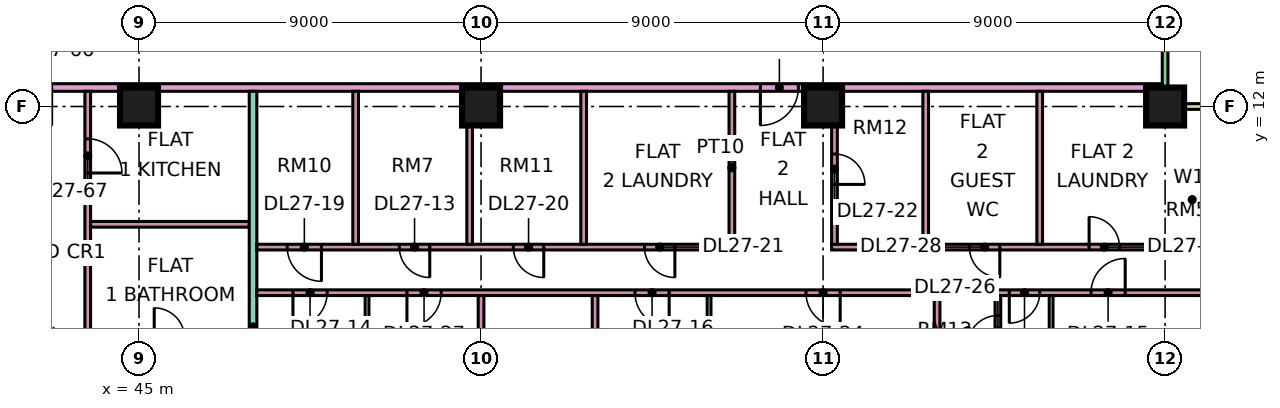
"""IFC4 building model, lengths in metres.
Left out: names, types, materials, properties, quantities, classifications, styles, units other than length and angle.
Written with IfcOpenShell. Run it as: python <this file> out.ifc"""

import sys

from ifc_helpers import new_model, si_unit, direction, frame, frame_2d, origin, origin_2d, place, context, subcontext, project, spatial, rectangle, extrude, element, fill, save


model = new_model("IFC4")
c1 = context("Model", 3, precision=1e-05, world=origin(), true_north=direction((0.0, 1.0)))
c2 = subcontext(c1, "Body", "Model", "MODEL_VIEW")
j1 = project(units=[si_unit("LENGTHUNIT", "METRE"), si_unit("PLANEANGLEUNIT", "RADIAN")], contexts=[c1])
p1 = place(None, origin())
s1 = spatial("IfcSite", under=j1, at=p1, CompositionType="ELEMENT")
p2 = place(p1, origin())
s2 = spatial("IfcBuilding", under=s1, at=p2, CompositionType="ELEMENT")
p3 = place(p2, frame((0.0, 0.0, 118.15)))
s3 = spatial("IfcBuildingStorey", under=s2, at=p3, CompositionType="ELEMENT", Elevation=118.15)
for number, where, z_axis, x_axis in (
    (1, (45.0, 12.0, 0.0), (0.0, 0.0, 1.0), (1.0, 0.0, 0.0)),
    (2, (54.0, 12.0, 0.0), (0.0, 0.0, 1.0), (1.0, 0.0, 0.0)),
    (3, (63.0, 12.0, 0.0), (0.0, 0.0, 1.0), (1.0, 0.0, 0.0)),
    (4, (72.0, 12.0, 0.0), (0.0, 0.0, 1.0), (1.0, 0.0, 0.0)),
):
    element("IfcColumn", number, at=place(p3, frame(where, z_axis=z_axis, x_axis=x_axis)), inside=s3, PredefinedType="COLUMN", context=c2, shape_type="SweptSolid", body=[
        extrude(rectangle(XDim=1.0, YDim=1.0, at=origin_2d()), origin(), (0.0, 0.0, 1.0), 3.75),
    ])
p4 = place(p3, frame((72.0, 12.075, 0.0), z_axis=(0.0, 0.0, 1.0), x_axis=(0.0, 1.0, 0.0)))
e5 = element("IfcWall", 5, at=p4, inside=s3, PredefinedType="SOLIDWALL", context=c2, shape_type="SweptSolid", body=[
    extrude(rectangle(XDim=10.35, YDim=0.15, at=frame_2d((5.175, 0.0))), origin(), (0.0, 0.0, 1.0), 3.35),
])
p5 = place(p4, frame((3.975, 0.0, 0.45)))
e6 = element("IfcOpeningElement", 6, at=p5, cuts=e5, PredefinedType="OPENING", context=c2, shape_type="SweptSolid", body=[
    extrude(rectangle(XDim=2.4, YDim=2.4, at=frame_2d((1.2, 1.2))), frame((0.0, 0.085, 0.0), z_axis=(0.0, -1.0, 0.0), x_axis=(1.0, 0.0, 0.0)), (0.0, 0.0, 1.0), 0.17),
])
p6 = place(p4, frame((7.688, 0.0, 0.0)))
e7 = element("IfcOpeningElement", 7, at=p6, cuts=e5, PredefinedType="OPENING", context=c2, shape_type="SweptSolid", body=[
    extrude(rectangle(XDim=1.8, YDim=2.4, at=frame_2d((0.9, 1.2))), frame((0.0, 0.085, 0.0), z_axis=(0.0, -1.0, 0.0), x_axis=(1.0, 0.0, 0.0)), (0.0, 0.0, 1.0), 0.17),
])
p7 = place(p3, frame((73.5, 12.0, 0.0), z_axis=(0.0, 0.0, 1.0), x_axis=(-1.0, 0.0, 0.0)))
e8 = element("IfcWall", 8, at=p7, inside=s3, PredefinedType="SOLIDWALL", context=c2, shape_type="SweptSolid", body=[
    extrude(rectangle(XDim=1.5, YDim=0.15, at=frame_2d((0.75, 0.0))), origin(), (0.0, 0.0, 1.0), 3.35),
])
p8 = place(p3, frame((40.65, 12.5, 0.0), z_axis=(0.0, 0.0, 1.0), x_axis=(1.0, 0.0, 0.0)))
e9 = element("IfcWall", 9, at=p8, inside=s3, PredefinedType="PARTITIONING", context=c2, shape_type="SweptSolid", body=[
    extrude(rectangle(XDim=31.276, YDim=0.2, at=frame_2d((15.638, 0.0))), origin(), (0.0, 0.0, 1.0), 3.35),
])
p9 = place(p8, frame((20.7, 0.0, 0.0)))
e10 = element("IfcOpeningElement", 10, at=p9, cuts=e9, PredefinedType="OPENING", context=c2, shape_type="SweptSolid", body=[
    extrude(rectangle(XDim=1.0, YDim=2.1, at=frame_2d((0.5, 1.05))), frame((0.0, 0.11, 0.0), z_axis=(0.0, -1.0, 0.0), x_axis=(1.0, 0.0, 0.0)), (0.0, 0.0, 1.0), 0.22),
])
p10 = place(p8, frame((1.05, 0.0, 0.0)))
e11 = element("IfcOpeningElement", 11, at=p10, cuts=e9, PredefinedType="OPENING", context=c2, shape_type="SweptSolid", body=[
    extrude(rectangle(XDim=1.0, YDim=2.1, at=frame_2d((0.5, 1.05))), frame((0.0, 0.11, 0.0), z_axis=(0.0, -1.0, 0.0), x_axis=(1.0, 0.0, 0.0)), (0.0, 0.0, 1.0), 0.22),
])
p11 = place(p3, frame((43.65, 5.825, 0.0), z_axis=(0.0, 0.0, 1.0), x_axis=(0.0, 1.0, 0.0)))
e12 = element("IfcWall", 12, at=p11, inside=s3, PredefinedType="PARTITIONING", context=c2, shape_type="SweptSolid", body=[
    extrude(rectangle(XDim=6.575, YDim=0.15, at=frame_2d((3.288, 0.0))), origin(), (0.0, 0.0, 1.0), 3.35),
])
p12 = place(p11, frame((4.425, 0.0, 0.0)))
e13 = element("IfcOpeningElement", 13, at=p12, cuts=e12, PredefinedType="OPENING", context=c2, shape_type="SweptSolid", body=[
    extrude(rectangle(XDim=0.9, YDim=2.1, at=frame_2d((0.45, 1.05))), frame((0.0, 0.085, 0.0), z_axis=(0.0, -1.0, 0.0), x_axis=(1.0, 0.0, 0.0)), (0.0, 0.0, 1.0), 0.17),
])
p13 = place(p3, frame((43.725, 8.9, 0.0), z_axis=(0.0, 0.0, 1.0), x_axis=(1.0, 0.0, 0.0)))
e14 = element("IfcWall", 14, at=p13, inside=s3, PredefinedType="PARTITIONING", context=c2, shape_type="SweptSolid", body=[
    extrude(rectangle(XDim=4.175, YDim=0.15, at=frame_2d((2.087, 0.0))), origin(), (0.0, 0.0, 1.0), 3.35),
])
p14 = place(p3, frame((48.0, 0.0, 0.0), z_axis=(0.0, 0.0, 1.0), x_axis=(0.0, 1.0, 0.0)))
e15 = element("IfcWall", 15, at=p14, inside=s3, PredefinedType="PARTITIONING", context=c2, shape_type="SweptSolid", body=[
    extrude(rectangle(XDim=12.4, YDim=0.2, at=frame_2d((6.2, 0.0))), origin(), (0.0, 0.0, 1.0), 3.35),
])
p15 = place(p3, frame((48.1, 7.1, 0.0), z_axis=(0.0, 0.0, 1.0), x_axis=(1.0, 0.0, 0.0)))
e16 = element("IfcWall", 16, at=p15, inside=s3, PredefinedType="PARTITIONING", context=c2, shape_type="SweptSolid", body=[
    extrude(rectangle(XDim=25.25, YDim=0.15, at=frame_2d((12.625, 0.0))), origin(), (0.0, 0.0, 1.0), 3.35),
])
p16 = place(p15, frame((0.95, 0.0, 0.0)))
e17 = element("IfcOpeningElement", 17, at=p16, cuts=e16, PredefinedType="OPENING", context=c2, shape_type="SweptSolid", body=[
    extrude(rectangle(XDim=0.9, YDim=2.1, at=frame_2d((0.45, 1.05))), frame((0.0, 0.085, 0.0), z_axis=(0.0, -1.0, 0.0), x_axis=(1.0, 0.0, 0.0)), (0.0, 0.0, 1.0), 0.17),
])
p17 = place(p15, frame((21.95, 0.0, 0.0)))
e18 = element("IfcOpeningElement", 18, at=p17, cuts=e16, PredefinedType="OPENING", context=c2, shape_type="SweptSolid", body=[
    extrude(rectangle(XDim=0.9, YDim=2.1, at=frame_2d((0.45, 1.05))), frame((0.0, 0.085, 0.0), z_axis=(0.0, -1.0, 0.0), x_axis=(1.0, 0.0, 0.0)), (0.0, 0.0, 1.0), 0.17),
])
p18 = place(p15, frame((9.95, 0.0, 0.0)))
e19 = element("IfcOpeningElement", 19, at=p18, cuts=e16, PredefinedType="OPENING", context=c2, shape_type="SweptSolid", body=[
    extrude(rectangle(XDim=0.9, YDim=2.1, at=frame_2d((0.45, 1.05))), frame((0.0, 0.085, 0.0), z_axis=(0.0, -1.0, 0.0), x_axis=(1.0, 0.0, 0.0)), (0.0, 0.0, 1.0), 0.17),
])
p19 = place(p15, frame((14.45, 0.0, 0.0)))
e20 = element("IfcOpeningElement", 20, at=p19, cuts=e16, PredefinedType="OPENING", context=c2, shape_type="SweptSolid", body=[
    extrude(rectangle(XDim=0.9, YDim=2.1, at=frame_2d((0.45, 1.05))), frame((0.0, 0.085, 0.0), z_axis=(0.0, -1.0, 0.0), x_axis=(1.0, 0.0, 0.0)), (0.0, 0.0, 1.0), 0.17),
])
p20 = place(p15, frame((19.8, 0.0, 0.0)))
e21 = element("IfcOpeningElement", 21, at=p20, cuts=e16, PredefinedType="OPENING", context=c2, shape_type="SweptSolid", body=[
    extrude(rectangle(XDim=0.8, YDim=2.1, at=frame_2d((0.4, 1.05))), frame((0.0, 0.085, 0.0), z_axis=(0.0, -1.0, 0.0), x_axis=(1.0, 0.0, 0.0)), (0.0, 0.0, 1.0), 0.17),
])
p21 = place(p15, frame((3.95, 0.0, 0.0)))
e22 = element("IfcOpeningElement", 22, at=p21, cuts=e16, PredefinedType="OPENING", context=c2, shape_type="SweptSolid", body=[
    extrude(rectangle(XDim=0.9, YDim=2.1, at=frame_2d((0.45, 1.05))), frame((0.0, 0.085, 0.0), z_axis=(0.0, -1.0, 0.0), x_axis=(1.0, 0.0, 0.0)), (0.0, 0.0, 1.0), 0.17),
])
p22 = place(p3, frame((48.1, 8.3, 0.0), z_axis=(0.0, 0.0, 1.0), x_axis=(1.0, 0.0, 0.0)))
e23 = element("IfcWall", 23, at=p22, inside=s3, PredefinedType="PARTITIONING", context=c2, shape_type="SweptSolid", body=[
    extrude(rectangle(XDim=12.575, YDim=0.15, at=frame_2d((6.288, 0.0))), origin(), (0.0, 0.0, 1.0), 3.35),
])
p23 = place(p22, frame((3.75, 0.0, 0.0)))
e24 = element("IfcOpeningElement", 24, at=p23, cuts=e23, PredefinedType="OPENING", context=c2, shape_type="SweptSolid", body=[
    extrude(rectangle(XDim=0.8, YDim=2.1, at=frame_2d((0.4, 1.05))), frame((0.0, 0.085, 0.0), z_axis=(0.0, -1.0, 0.0), x_axis=(1.0, 0.0, 0.0)), (0.0, 0.0, 1.0), 0.17),
])
p24 = place(p22, frame((0.8, 0.0, 0.0)))
e25 = element("IfcOpeningElement", 25, at=p24, cuts=e23, PredefinedType="OPENING", context=c2, shape_type="SweptSolid", body=[
    extrude(rectangle(XDim=0.9, YDim=2.1, at=frame_2d((0.45, 1.05))), frame((0.0, 0.085, 0.0), z_axis=(0.0, -1.0, 0.0), x_axis=(1.0, 0.0, 0.0)), (0.0, 0.0, 1.0), 0.17),
])
p25 = place(p22, frame((6.75, 0.0, 0.0)))
e26 = element("IfcOpeningElement", 26, at=p25, cuts=e23, PredefinedType="OPENING", context=c2, shape_type="SweptSolid", body=[
    extrude(rectangle(XDim=0.8, YDim=2.1, at=frame_2d((0.4, 1.05))), frame((0.0, 0.085, 0.0), z_axis=(0.0, -1.0, 0.0), x_axis=(1.0, 0.0, 0.0)), (0.0, 0.0, 1.0), 0.17),
])
p26 = place(p22, frame((10.2, 0.0, 0.0)))
e27 = element("IfcOpeningElement", 27, at=p26, cuts=e23, PredefinedType="OPENING", context=c2, shape_type="SweptSolid", body=[
    extrude(rectangle(XDim=0.8, YDim=2.1, at=frame_2d((0.4, 1.05))), frame((0.0, 0.085, 0.0), z_axis=(0.0, -1.0, 0.0), x_axis=(1.0, 0.0, 0.0)), (0.0, 0.0, 1.0), 0.17),
])
p27 = place(p3, frame((50.7, 8.375, 0.0), z_axis=(0.0, 0.0, 1.0), x_axis=(0.0, 1.0, 0.0)))
e28 = element("IfcWall", 28, at=p27, inside=s3, PredefinedType="PARTITIONING", context=c2, shape_type="SweptSolid", body=[
    extrude(rectangle(XDim=4.025, YDim=0.15, at=frame_2d((2.012, 0.0))), origin(), (0.0, 0.0, 1.0), 3.35),
])
p28 = place(p3, frame((51.0, -1.35, 0.0), z_axis=(0.0, 0.0, 1.0), x_axis=(0.0, 1.0, 0.0)))
e29 = element("IfcWall", 29, at=p28, inside=s3, PredefinedType="PARTITIONING", context=c2, shape_type="SweptSolid", body=[
    extrude(rectangle(XDim=8.375, YDim=0.1, at=frame_2d((4.188, 0.0))), origin(), (0.0, 0.0, 1.0), 3.35),
])
p29 = place(p3, frame((53.7, 8.375, 0.0), z_axis=(0.0, 0.0, 1.0), x_axis=(0.0, 1.0, 0.0)))
e30 = element("IfcWall", 30, at=p29, inside=s3, PredefinedType="PARTITIONING", context=c2, shape_type="SweptSolid", body=[
    extrude(rectangle(XDim=4.025, YDim=0.15, at=frame_2d((2.012, 0.0))), origin(), (0.0, 0.0, 1.0), 3.35),
])
p30 = place(p3, frame((54.0, 0.0, 0.0), z_axis=(0.0, 0.0, 1.0), x_axis=(0.0, 1.0, 0.0)))
e31 = element("IfcWall", 31, at=p30, inside=s3, PredefinedType="PARTITIONING", context=c2, shape_type="SweptSolid", body=[
    extrude(rectangle(XDim=7.025, YDim=0.15, at=frame_2d((3.512, 0.0))), origin(), (0.0, 0.0, 1.0), 3.35),
])
p31 = place(p3, frame((56.7, 8.375, 0.0), z_axis=(0.0, 0.0, 1.0), x_axis=(0.0, 1.0, 0.0)))
e32 = element("IfcWall", 32, at=p31, inside=s3, PredefinedType="PARTITIONING", context=c2, shape_type="SweptSolid", body=[
    extrude(rectangle(XDim=4.025, YDim=0.15, at=frame_2d((2.012, 0.0))), origin(), (0.0, 0.0, 1.0), 3.35),
])
p32 = place(p3, frame((57.0, 4.025, 0.0), z_axis=(0.0, 0.0, 1.0), x_axis=(0.0, 1.0, 0.0)))
e33 = element("IfcWall", 33, at=p32, inside=s3, PredefinedType="PARTITIONING", context=c2, shape_type="SweptSolid", body=[
    extrude(rectangle(XDim=3.0, YDim=0.15, at=frame_2d((1.5, 0.0))), origin(), (0.0, 0.0, 1.0), 3.35),
])
p33 = place(p32, frame((1.225, 0.0, 0.0)))
e34 = element("IfcOpeningElement", 34, at=p33, cuts=e33, PredefinedType="OPENING", context=c2, shape_type="SweptSolid", body=[
    extrude(rectangle(XDim=0.8, YDim=2.1, at=frame_2d((0.4, 1.05))), frame((0.0, 0.085, 0.0), z_axis=(0.0, -1.0, 0.0), x_axis=(1.0, 0.0, 0.0)), (0.0, 0.0, 1.0), 0.17),
])
p34 = place(p3, frame((60.0, 0.0, 0.0), z_axis=(0.0, 0.0, 1.0), x_axis=(0.0, 1.0, 0.0)))
e35 = element("IfcWall", 35, at=p34, inside=s3, PredefinedType="PARTITIONING", context=c2, shape_type="SweptSolid", body=[
    extrude(rectangle(XDim=7.025, YDim=0.1, at=frame_2d((3.512, 0.0))), origin(), (0.0, 0.0, 1.0), 3.35),
])
p35 = place(p3, frame((60.6, 8.375, 0.0), z_axis=(0.0, 0.0, 1.0), x_axis=(0.0, 1.0, 0.0)))
e36 = element("IfcWall", 36, at=p35, inside=s3, PredefinedType="PARTITIONING", context=c2, shape_type="SweptSolid", body=[
    extrude(rectangle(XDim=4.025, YDim=0.15, at=frame_2d((2.012, 0.0))), origin(), (0.0, 0.0, 1.0), 3.35),
])
p36 = place(p3, frame((63.225, 8.3, 0.0), z_axis=(0.0, 0.0, 1.0), x_axis=(1.0, 0.0, 0.0)))
e37 = element("IfcWall", 37, at=p36, inside=s3, PredefinedType="PARTITIONING", context=c2, shape_type="SweptSolid", body=[
    extrude(rectangle(XDim=10.125, YDim=0.15, at=frame_2d((5.062, 0.0))), origin(), (0.0, 0.0, 1.0), 3.35),
])
p37 = place(p36, frame((6.775, 0.0, 0.0)))
e38 = element("IfcOpeningElement", 38, at=p37, cuts=e37, PredefinedType="OPENING", context=c2, shape_type="SweptSolid", body=[
    extrude(rectangle(XDim=0.8, YDim=2.1, at=frame_2d((0.4, 1.05))), frame((0.0, 0.085, 0.0), z_axis=(0.0, -1.0, 0.0), x_axis=(1.0, 0.0, 0.0)), (0.0, 0.0, 1.0), 0.17),
])
p38 = place(p36, frame((3.625, 0.0, 0.0)))
e39 = element("IfcOpeningElement", 39, at=p38, cuts=e37, PredefinedType="OPENING", context=c2, shape_type="SweptSolid", body=[
    extrude(rectangle(XDim=0.8, YDim=2.1, at=frame_2d((0.4, 1.05))), frame((0.0, 0.085, 0.0), z_axis=(0.0, -1.0, 0.0), x_axis=(1.0, 0.0, 0.0)), (0.0, 0.0, 1.0), 0.17),
])
p39 = place(p3, frame((63.3, 8.375, 0.0), z_axis=(0.0, 0.0, 1.0), x_axis=(0.0, 1.0, 0.0)))
e40 = element("IfcWall", 40, at=p39, inside=s3, PredefinedType="PARTITIONING", context=c2, shape_type="SweptSolid", body=[
    extrude(rectangle(XDim=4.025, YDim=0.15, at=frame_2d((2.012, 0.0))), origin(), (0.0, 0.0, 1.0), 3.35),
])
p40 = place(p39, frame((1.575, 0.0, 0.0)))
e41 = element("IfcOpeningElement", 41, at=p40, cuts=e40, PredefinedType="OPENING", context=c2, shape_type="SweptSolid", body=[
    extrude(rectangle(XDim=0.8, YDim=2.1, at=frame_2d((0.4, 1.05))), frame((0.0, 0.085, 0.0), z_axis=(0.0, -1.0, 0.0), x_axis=(1.0, 0.0, 0.0)), (0.0, 0.0, 1.0), 0.17),
])
p41 = place(p3, frame((65.7, 8.375, 0.0), z_axis=(0.0, 0.0, 1.0), x_axis=(0.0, 1.0, 0.0)))
e42 = element("IfcWall", 42, at=p41, inside=s3, PredefinedType="PARTITIONING", context=c2, shape_type="SweptSolid", body=[
    extrude(rectangle(XDim=4.025, YDim=0.15, at=frame_2d((2.012, 0.0))), origin(), (0.0, 0.0, 1.0), 3.35),
])
p42 = place(p3, frame((66.0, 0.074, 0.0), z_axis=(0.0, 0.0, 1.0), x_axis=(0.0, 1.0, 0.0)))
e43 = element("IfcWall", 43, at=p42, inside=s3, PredefinedType="PARTITIONING", context=c2, shape_type="SweptSolid", body=[
    extrude(rectangle(XDim=6.951, YDim=0.15, at=frame_2d((3.476, 0.0))), origin(), (0.0, 0.0, 1.0), 3.35),
])
p43 = place(p3, frame((67.6, 5.025, 0.0), z_axis=(0.0, 0.0, 1.0), x_axis=(0.0, 1.0, 0.0)))
e44 = element("IfcWall", 44, at=p43, inside=s3, PredefinedType="PARTITIONING", context=c2, shape_type="SweptSolid", body=[
    extrude(rectangle(XDim=2.0, YDim=0.15, at=frame_2d((1.0, 0.0))), origin(), (0.0, 0.0, 1.0), 3.35),
])
p44 = place(p43, frame((0.675, 0.0, 0.0)))
e45 = element("IfcOpeningElement", 45, at=p44, cuts=e44, PredefinedType="OPENING", context=c2, shape_type="SweptSolid", body=[
    extrude(rectangle(XDim=0.8, YDim=2.1, at=frame_2d((0.4, 1.05))), frame((0.0, 0.085, 0.0), z_axis=(0.0, -1.0, 0.0), x_axis=(1.0, 0.0, 0.0)), (0.0, 0.0, 1.0), 0.17),
])
p45 = place(p3, frame((68.7, 8.375, 0.0), z_axis=(0.0, 0.0, 1.0), x_axis=(0.0, 1.0, 0.0)))
e46 = element("IfcWall", 46, at=p45, inside=s3, PredefinedType="PARTITIONING", context=c2, shape_type="SweptSolid", body=[
    extrude(rectangle(XDim=4.025, YDim=0.15, at=frame_2d((2.012, 0.0))), origin(), (0.0, 0.0, 1.0), 3.35),
])
p46 = place(p3, frame((69.0, 0.074, 0.0), z_axis=(0.0, 0.0, 1.0), x_axis=(0.0, 1.0, 0.0)))
e47 = element("IfcWall", 47, at=p46, inside=s3, PredefinedType="PARTITIONING", context=c2, shape_type="SweptSolid", body=[
    extrude(rectangle(XDim=6.951, YDim=0.1, at=frame_2d((3.476, 0.0))), origin(), (0.0, 0.0, 1.0), 3.35),
])
p47 = place(p23, origin())
e48 = element("IfcDoor", 48, at=p47, inside=s3, OperationType="SINGLE_SWING_RIGHT", PredefinedType="DOOR", context=c2, shape_type="SweptSolid", body=[
    extrude(rectangle(XDim=0.8, YDim=2.1, at=frame_2d((0.4, 1.05))), frame((0.0, 0.025, 0.0), z_axis=(0.0, -1.0, 0.0), x_axis=(1.0, 0.0, 0.0)), (0.0, 0.0, 1.0), 0.05),
])
fill(e24, e48)
p48 = place(p16, frame((0.9, 0.0, 0.0), z_axis=(0.0, 0.0, 1.0), x_axis=(-1.0, 0.0, 0.0)))
e49 = element("IfcDoor", 49, at=p48, inside=s3, OperationType="SINGLE_SWING_LEFT", PredefinedType="DOOR", context=c2, shape_type="SweptSolid", body=[
    extrude(rectangle(XDim=0.9, YDim=2.1, at=frame_2d((0.45, 1.05))), frame((0.0, 0.025, 0.0), z_axis=(0.0, -1.0, 0.0), x_axis=(1.0, 0.0, 0.0)), (0.0, 0.0, 1.0), 0.05),
])
fill(e17, e49)
p49 = place(p17, frame((0.9, 0.0, 0.0), z_axis=(0.0, 0.0, 1.0), x_axis=(-1.0, 0.0, 0.0)))
e50 = element("IfcDoor", 50, at=p49, inside=s3, OperationType="SINGLE_SWING_RIGHT", PredefinedType="DOOR", context=c2, shape_type="SweptSolid", body=[
    extrude(rectangle(XDim=0.9, YDim=2.1, at=frame_2d((0.45, 1.05))), frame((0.0, 0.025, 0.0), z_axis=(0.0, -1.0, 0.0), x_axis=(1.0, 0.0, 0.0)), (0.0, 0.0, 1.0), 0.05),
])
fill(e18, e50)
p50 = place(p18, origin())
e51 = element("IfcDoor", 51, at=p50, inside=s3, OperationType="SINGLE_SWING_RIGHT", PredefinedType="DOOR", context=c2, shape_type="SweptSolid", body=[
    extrude(rectangle(XDim=0.9, YDim=2.1, at=frame_2d((0.45, 1.05))), frame((0.0, 0.025, 0.0), z_axis=(0.0, -1.0, 0.0), x_axis=(1.0, 0.0, 0.0)), (0.0, 0.0, 1.0), 0.05),
])
fill(e19, e51)
p51 = place(p9, frame((1.0, 0.0, 0.0), z_axis=(0.0, 0.0, 1.0), x_axis=(-1.0, 0.0, 0.0)))
e52 = element("IfcDoor", 52, at=p51, inside=s3, OperationType="SINGLE_SWING_LEFT", PredefinedType="DOOR", context=c2, shape_type="SweptSolid", body=[
    extrude(rectangle(XDim=1.0, YDim=2.1, at=frame_2d((0.5, 1.05))), frame((0.0, 0.025, 0.0), z_axis=(0.0, -1.0, 0.0), x_axis=(1.0, 0.0, 0.0)), (0.0, 0.0, 1.0), 0.05),
])
fill(e10, e52)
p52 = place(p24, origin())
e53 = element("IfcDoor", 53, at=p52, inside=s3, OperationType="SINGLE_SWING_RIGHT", PredefinedType="DOOR", context=c2, shape_type="SweptSolid", body=[
    extrude(rectangle(XDim=0.9, YDim=2.1, at=frame_2d((0.45, 1.05))), frame((0.0, 0.025, 0.0), z_axis=(0.0, -1.0, 0.0), x_axis=(1.0, 0.0, 0.0)), (0.0, 0.0, 1.0), 0.05),
])
fill(e25, e53)
p53 = place(p25, origin())
e54 = element("IfcDoor", 54, at=p53, inside=s3, OperationType="SINGLE_SWING_RIGHT", PredefinedType="DOOR", context=c2, shape_type="SweptSolid", body=[
    extrude(rectangle(XDim=0.8, YDim=2.1, at=frame_2d((0.4, 1.05))), frame((0.0, 0.025, 0.0), z_axis=(0.0, -1.0, 0.0), x_axis=(1.0, 0.0, 0.0)), (0.0, 0.0, 1.0), 0.05),
])
fill(e26, e54)
p54 = place(p26, origin())
e55 = element("IfcDoor", 55, at=p54, inside=s3, OperationType="SINGLE_SWING_RIGHT", PredefinedType="DOOR", context=c2, shape_type="SweptSolid", body=[
    extrude(rectangle(XDim=0.8, YDim=2.1, at=frame_2d((0.4, 1.05))), frame((0.0, 0.025, 0.0), z_axis=(0.0, -1.0, 0.0), x_axis=(1.0, 0.0, 0.0)), (0.0, 0.0, 1.0), 0.05),
])
fill(e27, e55)
p55 = place(p40, frame((0.8, 0.0, 0.0), z_axis=(0.0, 0.0, 1.0), x_axis=(-1.0, 0.0, 0.0)))
e56 = element("IfcDoor", 56, at=p55, inside=s3, OperationType="SINGLE_SWING_LEFT", PredefinedType="DOOR", context=c2, shape_type="SweptSolid", body=[
    extrude(rectangle(XDim=0.8, YDim=2.1, at=frame_2d((0.4, 1.05))), frame((0.0, 0.025, 0.0), z_axis=(0.0, -1.0, 0.0), x_axis=(1.0, 0.0, 0.0)), (0.0, 0.0, 1.0), 0.05),
])
fill(e41, e56)
p56 = place(p37, origin())
e57 = element("IfcDoor", 57, at=p56, inside=s3, OperationType="SINGLE_SWING_LEFT", PredefinedType="DOOR", context=c2, shape_type="SweptSolid", body=[
    extrude(rectangle(XDim=0.8, YDim=2.1, at=frame_2d((0.4, 1.05))), frame((0.0, 0.025, 0.0), z_axis=(0.0, -1.0, 0.0), x_axis=(1.0, 0.0, 0.0)), (0.0, 0.0, 1.0), 0.05),
])
fill(e38, e57)
p57 = place(p19, origin())
e58 = element("IfcDoor", 58, at=p57, inside=s3, OperationType="SINGLE_SWING_RIGHT", PredefinedType="DOOR", context=c2, shape_type="SweptSolid", body=[
    extrude(rectangle(XDim=0.9, YDim=2.1, at=frame_2d((0.45, 1.05))), frame((0.0, 0.025, 0.0), z_axis=(0.0, -1.0, 0.0), x_axis=(1.0, 0.0, 0.0)), (0.0, 0.0, 1.0), 0.05),
])
fill(e20, e58)
p58 = place(p20, frame((0.8, 0.0, 0.0), z_axis=(0.0, 0.0, 1.0), x_axis=(-1.0, 0.0, 0.0)))
e59 = element("IfcDoor", 59, at=p58, inside=s3, OperationType="SINGLE_SWING_LEFT", PredefinedType="DOOR", context=c2, shape_type="SweptSolid", body=[
    extrude(rectangle(XDim=0.8, YDim=2.1, at=frame_2d((0.4, 1.05))), frame((0.0, 0.025, 0.0), z_axis=(0.0, -1.0, 0.0), x_axis=(1.0, 0.0, 0.0)), (0.0, 0.0, 1.0), 0.05),
])
fill(e21, e59)
p59 = place(p44, origin())
e60 = element("IfcDoor", 60, at=p59, inside=s3, OperationType="SINGLE_SWING_LEFT", PredefinedType="DOOR", context=c2, shape_type="SweptSolid", body=[
    extrude(rectangle(XDim=0.8, YDim=2.1, at=frame_2d((0.4, 1.05))), frame((0.0, 0.025, 0.0), z_axis=(0.0, -1.0, 0.0), x_axis=(1.0, 0.0, 0.0)), (0.0, 0.0, 1.0), 0.05),
])
fill(e45, e60)
p60 = place(p21, frame((0.9, 0.0, 0.0), z_axis=(0.0, 0.0, 1.0), x_axis=(-1.0, 0.0, 0.0)))
e61 = element("IfcDoor", 61, at=p60, inside=s3, OperationType="SINGLE_SWING_LEFT", PredefinedType="DOOR", context=c2, shape_type="SweptSolid", body=[
    extrude(rectangle(XDim=0.9, YDim=2.1, at=frame_2d((0.45, 1.05))), frame((0.0, 0.025, 0.0), z_axis=(0.0, -1.0, 0.0), x_axis=(1.0, 0.0, 0.0)), (0.0, 0.0, 1.0), 0.05),
])
fill(e22, e61)
p61 = place(p38, origin())
e62 = element("IfcDoor", 62, at=p61, inside=s3, OperationType="SINGLE_SWING_RIGHT", PredefinedType="DOOR", context=c2, shape_type="SweptSolid", body=[
    extrude(rectangle(XDim=0.8, YDim=2.1, at=frame_2d((0.4, 1.05))), frame((0.0, 0.025, 0.0), z_axis=(0.0, -1.0, 0.0), x_axis=(1.0, 0.0, 0.0)), (0.0, 0.0, 1.0), 0.05),
])
fill(e39, e62)
p62 = place(p12, frame((0.9, 0.0, 0.0), z_axis=(0.0, 0.0, 1.0), x_axis=(-1.0, 0.0, 0.0)))
e63 = element("IfcDoor", 63, at=p62, inside=s3, OperationType="SINGLE_SWING_LEFT", PredefinedType="DOOR", context=c2, shape_type="SweptSolid", body=[
    extrude(rectangle(XDim=0.9, YDim=2.1, at=frame_2d((0.45, 1.05))), frame((0.0, 0.025, 0.0), z_axis=(0.0, -1.0, 0.0), x_axis=(1.0, 0.0, 0.0)), (0.0, 0.0, 1.0), 0.05),
])
fill(e13, e63)
save(model, sys.argv[1])
